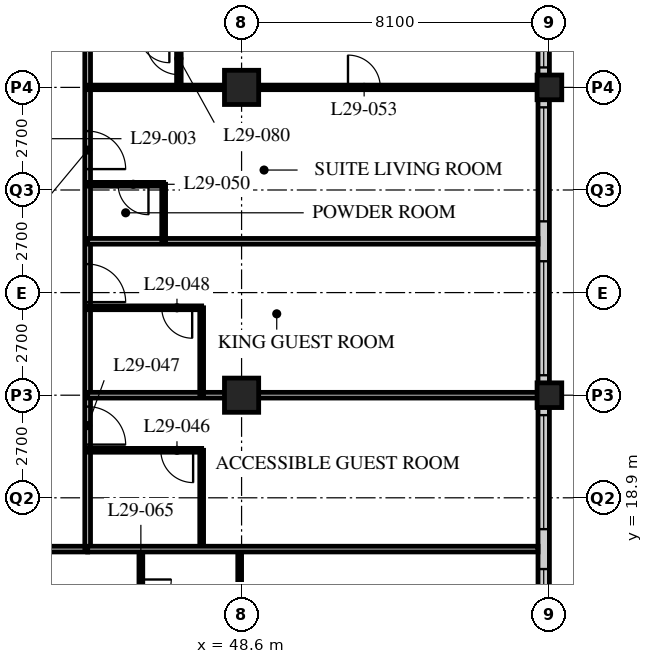
"""IFC4 building model, lengths in metres.
Left out: names, types, materials, properties, quantities, classifications, styles, units other than length and angle.
Written with IfcOpenShell. Run it as: python <this file> out.ifc"""

import sys

from ifc_helpers import new_model, si_unit, direction, frame, frame_2d, origin, origin_2d, place, context, subcontext, project, spatial, rectangle, hollow_rectangle, extrude, element, fill, save


model = new_model("IFC4")
c1 = context("Model", 3, precision=1e-05, world=origin(), true_north=direction((0.0, 1.0)))
c2 = subcontext(c1, "Body", "Model", "MODEL_VIEW")
j1 = project(units=[si_unit("LENGTHUNIT", "METRE"), si_unit("PLANEANGLEUNIT", "RADIAN")], contexts=[c1])
p1 = place(None, origin())
s1 = spatial("IfcSite", under=j1, at=p1, CompositionType="ELEMENT")
p2 = place(p1, origin())
s2 = spatial("IfcBuilding", under=s1, at=p2, CompositionType="ELEMENT")
p3 = place(p2, frame((0.0, 0.0, 117.0)))
s3 = spatial("IfcBuildingStorey", under=s2, at=p3, CompositionType="ELEMENT", Elevation=117.0)
for number, where, z_axis, x_axis in (
    (1, (48.6, 21.6, 0.0), (0.0, 0.0, 1.0), (1.0, 0.0, 0.0)),
    (2, (48.6, 29.7, 0.0), (0.0, 0.0, 1.0), (1.0, 0.0, 0.0)),
):
    element("IfcColumn", number, at=place(p3, frame(where, z_axis=z_axis, x_axis=x_axis)), inside=s3, PredefinedType="COLUMN", context=c2, shape_type="SweptSolid", body=[
        extrude(hollow_rectangle(XDim=0.9, YDim=0.9, WallThickness=0.09, at=origin_2d()), origin(), (0.0, 0.0, 1.0), 3.4),
    ])
for number, where, z_axis, x_axis in (
    (3, (56.7, 21.6, 0.0), (0.0, 0.0, 1.0), (1.0, 0.0, 0.0)),
    (4, (56.7, 29.7, 0.0), (0.0, 0.0, 1.0), (1.0, 0.0, 0.0)),
):
    element("IfcColumn", number, at=place(p3, frame(where, z_axis=z_axis, x_axis=x_axis)), inside=s3, PredefinedType="COLUMN", context=c2, shape_type="SweptSolid", body=[
        extrude(hollow_rectangle(XDim=0.65, YDim=0.65, WallThickness=0.055, at=origin_2d()), origin(), (0.0, 0.0, 1.0), 3.4),
    ])
p4 = place(p3, frame((56.55, 13.8, 0.0), z_axis=(0.0, 0.0, 1.0), x_axis=(0.0, 1.0, 0.0)))
e5 = element("IfcWall", 5, at=p4, inside=s3, PredefinedType="SOLIDWALL", context=c2, shape_type="SweptSolid", body=[
    extrude(rectangle(XDim=32.1, YDim=0.3, at=frame_2d((16.05, 0.0))), origin(), (0.0, 0.0, 1.0), 3.19),
])
p5 = place(p4, frame((0.225, 0.0, 0.9)))
e6 = element("IfcOpeningElement", 6, at=p5, cuts=e5, PredefinedType="OPENING", context=c2, shape_type="SweptSolid", body=[
    extrude(rectangle(XDim=3.0, YDim=2.0, at=frame_2d((1.5, 1.0))), frame((0.0, 0.16, 0.0), z_axis=(0.0, -1.0, 0.0), x_axis=(1.0, 0.0, 0.0)), (0.0, 0.0, 1.0), 0.32),
])
p6 = place(p4, frame((4.275, 0.0, 0.9)))
e7 = element("IfcOpeningElement", 7, at=p6, cuts=e5, PredefinedType="OPENING", context=c2, shape_type="SweptSolid", body=[
    extrude(rectangle(XDim=3.0, YDim=2.0, at=frame_2d((1.5, 1.0))), frame((0.0, 0.16, 0.0), z_axis=(0.0, -1.0, 0.0), x_axis=(1.0, 0.0, 0.0)), (0.0, 0.0, 1.0), 0.32),
])
p7 = place(p4, frame((8.325, 0.0, 0.9)))
e8 = element("IfcOpeningElement", 8, at=p7, cuts=e5, PredefinedType="OPENING", context=c2, shape_type="SweptSolid", body=[
    extrude(rectangle(XDim=3.0, YDim=2.0, at=frame_2d((1.5, 1.0))), frame((0.0, 0.16, 0.0), z_axis=(0.0, -1.0, 0.0), x_axis=(1.0, 0.0, 0.0)), (0.0, 0.0, 1.0), 0.32),
])
p8 = place(p4, frame((12.375, 0.0, 0.9)))
e9 = element("IfcOpeningElement", 9, at=p8, cuts=e5, PredefinedType="OPENING", context=c2, shape_type="SweptSolid", body=[
    extrude(rectangle(XDim=3.0, YDim=2.0, at=frame_2d((1.5, 1.0))), frame((0.0, 0.16, 0.0), z_axis=(0.0, -1.0, 0.0), x_axis=(1.0, 0.0, 0.0)), (0.0, 0.0, 1.0), 0.32),
])
p9 = place(p4, frame((16.425, 0.0, 0.9)))
e10 = element("IfcOpeningElement", 10, at=p9, cuts=e5, PredefinedType="OPENING", context=c2, shape_type="SweptSolid", body=[
    extrude(rectangle(XDim=3.0, YDim=2.0, at=frame_2d((1.5, 1.0))), frame((0.0, 0.16, 0.0), z_axis=(0.0, -1.0, 0.0), x_axis=(1.0, 0.0, 0.0)), (0.0, 0.0, 1.0), 0.32),
])
p10 = place(p4, frame((20.475, 0.0, 0.9)))
e11 = element("IfcOpeningElement", 11, at=p10, cuts=e5, PredefinedType="OPENING", context=c2, shape_type="SweptSolid", body=[
    extrude(rectangle(XDim=3.0, YDim=2.0, at=frame_2d((1.5, 1.0))), frame((0.0, 0.16, 0.0), z_axis=(0.0, -1.0, 0.0), x_axis=(1.0, 0.0, 0.0)), (0.0, 0.0, 1.0), 0.32),
])
p11 = place(p4, frame((24.525, 0.0, 0.9)))
e12 = element("IfcOpeningElement", 12, at=p11, cuts=e5, PredefinedType="OPENING", context=c2, shape_type="SweptSolid", body=[
    extrude(rectangle(XDim=3.0, YDim=2.0, at=frame_2d((1.5, 1.0))), frame((0.0, 0.16, 0.0), z_axis=(0.0, -1.0, 0.0), x_axis=(1.0, 0.0, 0.0)), (0.0, 0.0, 1.0), 0.32),
])
p12 = place(p4, frame((28.575, 0.0, 0.9)))
e13 = element("IfcOpeningElement", 13, at=p12, cuts=e5, PredefinedType="OPENING", context=c2, shape_type="SweptSolid", body=[
    extrude(rectangle(XDim=3.0, YDim=2.0, at=frame_2d((1.5, 1.0))), frame((0.0, 0.16, 0.0), z_axis=(0.0, -1.0, 0.0), x_axis=(1.0, 0.0, 0.0)), (0.0, 0.0, 1.0), 0.32),
])
p13 = place(p3, frame((12.15, 17.55, 0.0), z_axis=(0.0, 0.0, 1.0), x_axis=(1.0, 0.0, 0.0)))
e14 = element("IfcWall", 14, at=p13, inside=s3, PredefinedType="PARTITIONING", context=c2, shape_type="SweptSolid", body=[
    extrude(rectangle(XDim=32.4, YDim=0.15, at=frame_2d((16.2, 0.0))), origin(), (0.0, 0.0, 1.0), 3.19),
])
p14 = place(p13, frame((5.95, 0.0, 0.0)))
e15 = element("IfcOpeningElement", 15, at=p14, cuts=e14, PredefinedType="OPENING", context=c2, shape_type="SweptSolid", body=[
    extrude(rectangle(XDim=1.0, YDim=2.1, at=frame_2d((0.5, 1.05))), frame((0.0, 0.085, 0.0), z_axis=(0.0, -1.0, 0.0), x_axis=(1.0, 0.0, 0.0)), (0.0, 0.0, 1.0), 0.17),
])
p15 = place(p13, frame((17.725, 0.0, 0.0)))
e16 = element("IfcOpeningElement", 16, at=p15, cuts=e14, PredefinedType="OPENING", context=c2, shape_type="SweptSolid", body=[
    extrude(rectangle(XDim=1.0, YDim=2.1, at=frame_2d((0.5, 1.05))), frame((0.0, 0.085, 0.0), z_axis=(0.0, -1.0, 0.0), x_axis=(1.0, 0.0, 0.0)), (0.0, 0.0, 1.0), 0.17),
])
p16 = place(p13, frame((26.75, 0.0, 0.0)))
e17 = element("IfcOpeningElement", 17, at=p16, cuts=e14, PredefinedType="OPENING", context=c2, shape_type="SweptSolid", body=[
    extrude(rectangle(XDim=1.0, YDim=2.1, at=frame_2d((0.5, 1.05))), frame((0.0, 0.085, 0.0), z_axis=(0.0, -1.0, 0.0), x_axis=(1.0, 0.0, 0.0)), (0.0, 0.0, 1.0), 0.17),
])
p17 = place(p13, frame((1.525, 0.0, 0.0)))
e18 = element("IfcOpeningElement", 18, at=p17, cuts=e14, PredefinedType="OPENING", context=c2, shape_type="SweptSolid", body=[
    extrude(rectangle(XDim=1.0, YDim=2.1, at=frame_2d((0.5, 1.05))), frame((0.0, 0.085, 0.0), z_axis=(0.0, -1.0, 0.0), x_axis=(1.0, 0.0, 0.0)), (0.0, 0.0, 1.0), 0.17),
])
p18 = place(p13, frame((29.875, 0.0, 0.0)))
e19 = element("IfcOpeningElement", 19, at=p18, cuts=e14, PredefinedType="OPENING", context=c2, shape_type="SweptSolid", body=[
    extrude(rectangle(XDim=1.0, YDim=2.1, at=frame_2d((0.5, 1.05))), frame((0.0, 0.085, 0.0), z_axis=(0.0, -1.0, 0.0), x_axis=(1.0, 0.0, 0.0)), (0.0, 0.0, 1.0), 0.17),
])
p19 = place(p3, frame((44.55, 17.55, 0.0), z_axis=(0.0, 0.0, 1.0), x_axis=(0.0, 1.0, 0.0)))
e20 = element("IfcWall", 20, at=p19, inside=s3, PredefinedType="PARTITIONING", context=c2, shape_type="SweptSolid", body=[
    extrude(rectangle(XDim=28.35, YDim=0.15, at=frame_2d((14.175, 0.0))), origin(), (0.0, 0.0, 1.0), 3.19),
])
p20 = place(p19, frame((2.75, 0.0, 0.0)))
e21 = element("IfcOpeningElement", 21, at=p20, cuts=e20, PredefinedType="OPENING", context=c2, shape_type="SweptSolid", body=[
    extrude(rectangle(XDim=1.0, YDim=2.1, at=frame_2d((0.5, 1.05))), frame((0.0, 0.085, 0.0), z_axis=(0.0, -1.0, 0.0), x_axis=(1.0, 0.0, 0.0)), (0.0, 0.0, 1.0), 0.17),
])
p21 = place(p19, frame((6.5, 0.0, 0.0)))
e22 = element("IfcOpeningElement", 22, at=p21, cuts=e20, PredefinedType="OPENING", context=c2, shape_type="SweptSolid", body=[
    extrude(rectangle(XDim=1.0, YDim=2.1, at=frame_2d((0.5, 1.05))), frame((0.0, 0.085, 0.0), z_axis=(0.0, -1.0, 0.0), x_axis=(1.0, 0.0, 0.0)), (0.0, 0.0, 1.0), 0.17),
])
p22 = place(p19, frame((10.0, 0.0, 0.0)))
e23 = element("IfcOpeningElement", 23, at=p22, cuts=e20, PredefinedType="OPENING", context=c2, shape_type="SweptSolid", body=[
    extrude(rectangle(XDim=1.0, YDim=2.1, at=frame_2d((0.5, 1.05))), frame((0.0, 0.085, 0.0), z_axis=(0.0, -1.0, 0.0), x_axis=(1.0, 0.0, 0.0)), (0.0, 0.0, 1.0), 0.17),
])
p23 = place(p19, frame((21.65, 0.0, 0.0)))
e24 = element("IfcOpeningElement", 24, at=p23, cuts=e20, PredefinedType="OPENING", context=c2, shape_type="SweptSolid", body=[
    extrude(rectangle(XDim=1.0, YDim=2.1, at=frame_2d((0.5, 1.05))), frame((0.0, 0.085, 0.0), z_axis=(0.0, -1.0, 0.0), x_axis=(1.0, 0.0, 0.0)), (0.0, 0.0, 1.0), 0.17),
])
p24 = place(p19, frame((26.75, 0.0, 0.0)))
e25 = element("IfcOpeningElement", 25, at=p24, cuts=e20, PredefinedType="OPENING", context=c2, shape_type="SweptSolid", body=[
    extrude(rectangle(XDim=1.0, YDim=2.1, at=frame_2d((0.5, 1.05))), frame((0.0, 0.085, 0.0), z_axis=(0.0, -1.0, 0.0), x_axis=(1.0, 0.0, 0.0)), (0.0, 0.0, 1.0), 0.17),
])
p25 = place(p3, frame((47.55, 17.55, 0.0), z_axis=(0.0, 0.0, 1.0), x_axis=(0.0, 1.0, 0.0)))
e26 = element("IfcWall", 26, at=p25, inside=s3, PredefinedType="PARTITIONING", context=c2, shape_type="SweptSolid", body=[
    extrude(rectangle(XDim=2.6, YDim=0.1, at=frame_2d((1.3, 0.0))), origin(), (0.0, 0.0, 1.0), 3.19),
])
p26 = place(p3, frame((44.55, 20.15, 0.0), z_axis=(0.0, 0.0, 1.0), x_axis=(1.0, 0.0, 0.0)))
e27 = element("IfcWall", 27, at=p26, inside=s3, PredefinedType="PARTITIONING", context=c2, shape_type="SweptSolid", body=[
    extrude(rectangle(XDim=3.0, YDim=0.1, at=frame_2d((1.5, 0.0))), origin(), (0.0, 0.0, 1.0), 3.19),
])
p27 = place(p26, frame((1.925, 0.0, 0.0)))
e28 = element("IfcOpeningElement", 28, at=p27, cuts=e27, PredefinedType="OPENING", context=c2, shape_type="SweptSolid", body=[
    extrude(rectangle(XDim=0.85, YDim=2.1, at=frame_2d((0.425, 1.05))), frame((0.0, 0.06, 0.0), z_axis=(0.0, -1.0, 0.0), x_axis=(1.0, 0.0, 0.0)), (0.0, 0.0, 1.0), 0.12),
])
p28 = place(p3, frame((44.55, 21.6, 0.0), z_axis=(0.0, 0.0, 1.0), x_axis=(1.0, 0.0, 0.0)))
e29 = element("IfcWall", 29, at=p28, inside=s3, PredefinedType="PARTITIONING", context=c2, shape_type="SweptSolid", body=[
    extrude(rectangle(XDim=11.85, YDim=0.15, at=frame_2d((5.925, 0.0))), origin(), (0.0, 0.0, 1.0), 2.578),
])
p29 = place(p3, frame((47.55, 21.6, 0.0), z_axis=(0.0, 0.0, 1.0), x_axis=(0.0, 1.0, 0.0)))
e30 = element("IfcWall", 30, at=p29, inside=s3, PredefinedType="PARTITIONING", context=c2, shape_type="SweptSolid", body=[
    extrude(rectangle(XDim=2.3, YDim=0.1, at=frame_2d((1.15, 0.0))), origin(), (0.0, 0.0, 1.0), 3.19),
])
p30 = place(p3, frame((44.55, 23.9, 0.0), z_axis=(0.0, 0.0, 1.0), x_axis=(1.0, 0.0, 0.0)))
e31 = element("IfcWall", 31, at=p30, inside=s3, PredefinedType="PARTITIONING", context=c2, shape_type="SweptSolid", body=[
    extrude(rectangle(XDim=3.0, YDim=0.1, at=frame_2d((1.5, 0.0))), origin(), (0.0, 0.0, 1.0), 3.19),
])
p31 = place(p30, frame((1.95, 0.0, 0.0)))
e32 = element("IfcOpeningElement", 32, at=p31, cuts=e31, PredefinedType="OPENING", context=c2, shape_type="SweptSolid", body=[
    extrude(rectangle(XDim=0.8, YDim=2.1, at=frame_2d((0.4, 1.05))), frame((0.0, 0.06, 0.0), z_axis=(0.0, -1.0, 0.0), x_axis=(1.0, 0.0, 0.0)), (0.0, 0.0, 1.0), 0.12),
])
p32 = place(p3, frame((44.55, 25.65, 0.0), z_axis=(0.0, 0.0, 1.0), x_axis=(1.0, 0.0, 0.0)))
e33 = element("IfcWall", 33, at=p32, inside=s3, PredefinedType="PARTITIONING", context=c2, shape_type="SweptSolid", body=[
    extrude(rectangle(XDim=11.85, YDim=0.15, at=frame_2d((5.925, 0.0))), origin(), (0.0, 0.0, 1.0), 3.19),
])
p33 = place(p3, frame((46.55, 25.65, 0.0), z_axis=(0.0, 0.0, 1.0), x_axis=(0.0, 1.0, 0.0)))
e34 = element("IfcWall", 34, at=p33, inside=s3, PredefinedType="PARTITIONING", context=c2, shape_type="SweptSolid", body=[
    extrude(rectangle(XDim=1.5, YDim=0.1, at=frame_2d((0.75, 0.0))), origin(), (0.0, 0.0, 1.0), 3.19),
])
p34 = place(p3, frame((44.55, 27.15, 0.0), z_axis=(0.0, 0.0, 1.0), x_axis=(1.0, 0.0, 0.0)))
e35 = element("IfcWall", 35, at=p34, inside=s3, PredefinedType="PARTITIONING", context=c2, shape_type="SweptSolid", body=[
    extrude(rectangle(XDim=2.0, YDim=0.1, at=frame_2d((1.0, 0.0))), origin(), (0.0, 0.0, 1.0), 3.19),
])
p35 = place(p34, frame((0.8, 0.0, 0.0)))
e36 = element("IfcOpeningElement", 36, at=p35, cuts=e35, PredefinedType="OPENING", context=c2, shape_type="SweptSolid", body=[
    extrude(rectangle(XDim=0.8, YDim=2.1, at=frame_2d((0.4, 1.05))), frame((0.0, 0.06, 0.0), z_axis=(0.0, -1.0, 0.0), x_axis=(1.0, 0.0, 0.0)), (0.0, 0.0, 1.0), 0.12),
])
p36 = place(p3, frame((44.55, 29.7, 0.0), z_axis=(0.0, 0.0, 1.0), x_axis=(1.0, 0.0, 0.0)))
e37 = element("IfcWall", 37, at=p36, inside=s3, PredefinedType="PARTITIONING", context=c2, shape_type="SweptSolid", body=[
    extrude(rectangle(XDim=11.85, YDim=0.12, at=frame_2d((5.925, 0.0))), origin(), (0.0, 0.0, 1.0), 2.578),
])
p37 = place(p36, frame((6.85, 0.0, 0.0)))
e38 = element("IfcOpeningElement", 38, at=p37, cuts=e37, PredefinedType="OPENING", context=c2, shape_type="SweptSolid", body=[
    extrude(rectangle(XDim=0.85, YDim=2.1, at=frame_2d((0.425, 1.05))), frame((0.0, 0.07, 0.0), z_axis=(0.0, -1.0, 0.0), x_axis=(1.0, 0.0, 0.0)), (0.0, 0.0, 1.0), 0.14),
])
p38 = place(p3, frame((45.95, 17.55, 0.0), z_axis=(0.0, 0.0, 1.0), x_axis=(0.0, -1.0, 0.0)))
e39 = element("IfcWall", 39, at=p38, inside=s3, PredefinedType="PARTITIONING", context=c2, shape_type="SweptSolid", body=[
    extrude(rectangle(XDim=2.4, YDim=0.1, at=frame_2d((1.2, 0.0))), origin(), (0.0, 0.0, 1.0), 3.19),
])
p39 = place(p38, frame((0.8, 0.0, 0.0)))
e40 = element("IfcOpeningElement", 40, at=p39, cuts=e39, PredefinedType="OPENING", context=c2, shape_type="SweptSolid", body=[
    extrude(rectangle(XDim=0.8, YDim=2.1, at=frame_2d((0.4, 1.05))), frame((0.0, 0.06, 0.0), z_axis=(0.0, -1.0, 0.0), x_axis=(1.0, 0.0, 0.0)), (0.0, 0.0, 1.0), 0.12),
])
p40 = place(p3, frame((48.55, 17.55, 0.0), z_axis=(0.0, 0.0, 1.0), x_axis=(0.0, -1.0, 0.0)))
e41 = element("IfcWall", 41, at=p40, inside=s3, PredefinedType="PARTITIONING", context=c2, shape_type="SweptSolid", body=[
    extrude(rectangle(XDim=2.4, YDim=0.1, at=frame_2d((1.2, 0.0))), origin(), (0.0, 0.0, 1.0), 2.578),
])
p41 = place(p3, frame((44.55, 17.55, 0.0), z_axis=(0.0, 0.0, 1.0), x_axis=(1.0, 0.0, 0.0)))
e42 = element("IfcWall", 42, at=p41, inside=s3, PredefinedType="PARTITIONING", context=c2, shape_type="SweptSolid", body=[
    extrude(rectangle(XDim=11.85, YDim=0.15, at=frame_2d((5.925, 0.0))), origin(), (0.0, 0.0, 1.0), 3.19),
])
p42 = place(p3, frame((46.95, 31.16, 0.0), z_axis=(0.0, 0.0, 1.0), x_axis=(0.0, -1.0, 0.0)))
e43 = element("IfcWall", 43, at=p42, inside=s3, PredefinedType="PARTITIONING", context=c2, shape_type="SweptSolid", body=[
    extrude(rectangle(XDim=1.46, YDim=0.12, at=frame_2d((0.73, 0.0))), origin(), (0.0, 0.0, 1.0), 3.19),
])
p43 = place(p42, frame((0.275, 0.0, 0.0)))
e44 = element("IfcOpeningElement", 44, at=p43, cuts=e43, PredefinedType="OPENING", context=c2, shape_type="SweptSolid", body=[
    extrude(rectangle(XDim=0.85, YDim=2.1, at=frame_2d((0.425, 1.05))), frame((0.0, 0.07, 0.0), z_axis=(0.0, -1.0, 0.0), x_axis=(1.0, 0.0, 0.0)), (0.0, 0.0, 1.0), 0.14),
])
p44 = place(p5, origin())
e45 = element("IfcWindow", 45, at=p44, inside=s3, PartitioningType="SINGLE_PANEL", PredefinedType="WINDOW", context=c2, shape_type="SweptSolid", body=[
    extrude(rectangle(XDim=3.0, YDim=2.0, at=frame_2d((1.5, 1.0))), frame((0.0, 0.03, 0.0), z_axis=(0.0, -1.0, 0.0), x_axis=(1.0, 0.0, 0.0)), (0.0, 0.0, 1.0), 0.06),
])
fill(e6, e45)
p45 = place(p6, origin())
e46 = element("IfcWindow", 46, at=p45, inside=s3, PartitioningType="SINGLE_PANEL", PredefinedType="WINDOW", context=c2, shape_type="SweptSolid", body=[
    extrude(rectangle(XDim=3.0, YDim=2.0, at=frame_2d((1.5, 1.0))), frame((0.0, 0.03, 0.0), z_axis=(0.0, -1.0, 0.0), x_axis=(1.0, 0.0, 0.0)), (0.0, 0.0, 1.0), 0.06),
])
fill(e7, e46)
p46 = place(p7, origin())
e47 = element("IfcWindow", 47, at=p46, inside=s3, PartitioningType="SINGLE_PANEL", PredefinedType="WINDOW", context=c2, shape_type="SweptSolid", body=[
    extrude(rectangle(XDim=3.0, YDim=2.0, at=frame_2d((1.5, 1.0))), frame((0.0, 0.03, 0.0), z_axis=(0.0, -1.0, 0.0), x_axis=(1.0, 0.0, 0.0)), (0.0, 0.0, 1.0), 0.06),
])
fill(e8, e47)
p47 = place(p8, origin())
e48 = element("IfcWindow", 48, at=p47, inside=s3, PartitioningType="SINGLE_PANEL", PredefinedType="WINDOW", context=c2, shape_type="SweptSolid", body=[
    extrude(rectangle(XDim=3.0, YDim=2.0, at=frame_2d((1.5, 1.0))), frame((0.0, 0.03, 0.0), z_axis=(0.0, -1.0, 0.0), x_axis=(1.0, 0.0, 0.0)), (0.0, 0.0, 1.0), 0.06),
])
fill(e9, e48)
p48 = place(p9, origin())
e49 = element("IfcWindow", 49, at=p48, inside=s3, PartitioningType="SINGLE_PANEL", PredefinedType="WINDOW", context=c2, shape_type="SweptSolid", body=[
    extrude(rectangle(XDim=3.0, YDim=2.0, at=frame_2d((1.5, 1.0))), frame((0.0, 0.03, 0.0), z_axis=(0.0, -1.0, 0.0), x_axis=(1.0, 0.0, 0.0)), (0.0, 0.0, 1.0), 0.06),
])
fill(e10, e49)
p49 = place(p27, origin())
e50 = element("IfcDoor", 50, at=p49, inside=s3, OperationType="SINGLE_SWING_LEFT", PredefinedType="DOOR", context=c2, shape_type="SweptSolid", body=[
    extrude(rectangle(XDim=0.85, YDim=2.1, at=frame_2d((0.425, 1.05))), frame((0.0, 0.025, 0.0), z_axis=(0.0, -1.0, 0.0), x_axis=(1.0, 0.0, 0.0)), (0.0, 0.0, 1.0), 0.05),
])
fill(e28, e50)
p50 = place(p20, origin())
e51 = element("IfcDoor", 51, at=p50, inside=s3, OperationType="SINGLE_SWING_RIGHT", PredefinedType="DOOR", context=c2, shape_type="SweptSolid", body=[
    extrude(rectangle(XDim=1.0, YDim=2.1, at=frame_2d((0.5, 1.05))), frame((0.0, 0.025, 0.0), z_axis=(0.0, -1.0, 0.0), x_axis=(1.0, 0.0, 0.0)), (0.0, 0.0, 1.0), 0.05),
])
fill(e21, e51)
p51 = place(p31, origin())
e52 = element("IfcDoor", 52, at=p51, inside=s3, OperationType="SINGLE_SWING_LEFT", PredefinedType="DOOR", context=c2, shape_type="SweptSolid", body=[
    extrude(rectangle(XDim=0.8, YDim=2.1, at=frame_2d((0.4, 1.05))), frame((0.0, 0.025, 0.0), z_axis=(0.0, -1.0, 0.0), x_axis=(1.0, 0.0, 0.0)), (0.0, 0.0, 1.0), 0.05),
])
fill(e32, e52)
p52 = place(p21, origin())
e53 = element("IfcDoor", 53, at=p52, inside=s3, OperationType="SINGLE_SWING_RIGHT", PredefinedType="DOOR", context=c2, shape_type="SweptSolid", body=[
    extrude(rectangle(XDim=1.0, YDim=2.1, at=frame_2d((0.5, 1.05))), frame((0.0, 0.025, 0.0), z_axis=(0.0, -1.0, 0.0), x_axis=(1.0, 0.0, 0.0)), (0.0, 0.0, 1.0), 0.05),
])
fill(e22, e53)
p53 = place(p35, origin())
e54 = element("IfcDoor", 54, at=p53, inside=s3, OperationType="SINGLE_SWING_LEFT", PredefinedType="DOOR", context=c2, shape_type="SweptSolid", body=[
    extrude(rectangle(XDim=0.8, YDim=2.1, at=frame_2d((0.4, 1.05))), frame((0.0, 0.025, 0.0), z_axis=(0.0, -1.0, 0.0), x_axis=(1.0, 0.0, 0.0)), (0.0, 0.0, 1.0), 0.05),
])
fill(e36, e54)
p54 = place(p22, origin())
e55 = element("IfcDoor", 55, at=p54, inside=s3, OperationType="SINGLE_SWING_RIGHT", PredefinedType="DOOR", context=c2, shape_type="SweptSolid", body=[
    extrude(rectangle(XDim=1.0, YDim=2.1, at=frame_2d((0.5, 1.05))), frame((0.0, 0.025, 0.0), z_axis=(0.0, -1.0, 0.0), x_axis=(1.0, 0.0, 0.0)), (0.0, 0.0, 1.0), 0.05),
])
fill(e23, e55)
p55 = place(p37, origin())
e56 = element("IfcDoor", 56, at=p55, inside=s3, OperationType="SINGLE_SWING_LEFT", PredefinedType="DOOR", context=c2, shape_type="SweptSolid", body=[
    extrude(rectangle(XDim=0.85, YDim=2.1, at=frame_2d((0.425, 1.05))), frame((0.0, 0.025, 0.0), z_axis=(0.0, -1.0, 0.0), x_axis=(1.0, 0.0, 0.0)), (0.0, 0.0, 1.0), 0.05),
])
fill(e38, e56)
p56 = place(p39, origin())
e57 = element("IfcDoor", 57, at=p56, inside=s3, OperationType="SINGLE_SWING_LEFT", PredefinedType="DOOR", context=c2, shape_type="SweptSolid", body=[
    extrude(rectangle(XDim=0.8, YDim=2.1, at=frame_2d((0.4, 1.05))), frame((0.0, 0.025, 0.0), z_axis=(0.0, -1.0, 0.0), x_axis=(1.0, 0.0, 0.0)), (0.0, 0.0, 1.0), 0.05),
])
fill(e40, e57)
p57 = place(p43, origin())
e58 = element("IfcDoor", 58, at=p57, inside=s3, OperationType="SINGLE_SWING_RIGHT", PredefinedType="DOOR", context=c2, shape_type="SweptSolid", body=[
    extrude(rectangle(XDim=0.85, YDim=2.1, at=frame_2d((0.425, 1.05))), frame((0.0, 0.025, 0.0), z_axis=(0.0, -1.0, 0.0), x_axis=(1.0, 0.0, 0.0)), (0.0, 0.0, 1.0), 0.05),
])
fill(e44, e58)
save(model, sys.argv[1])
